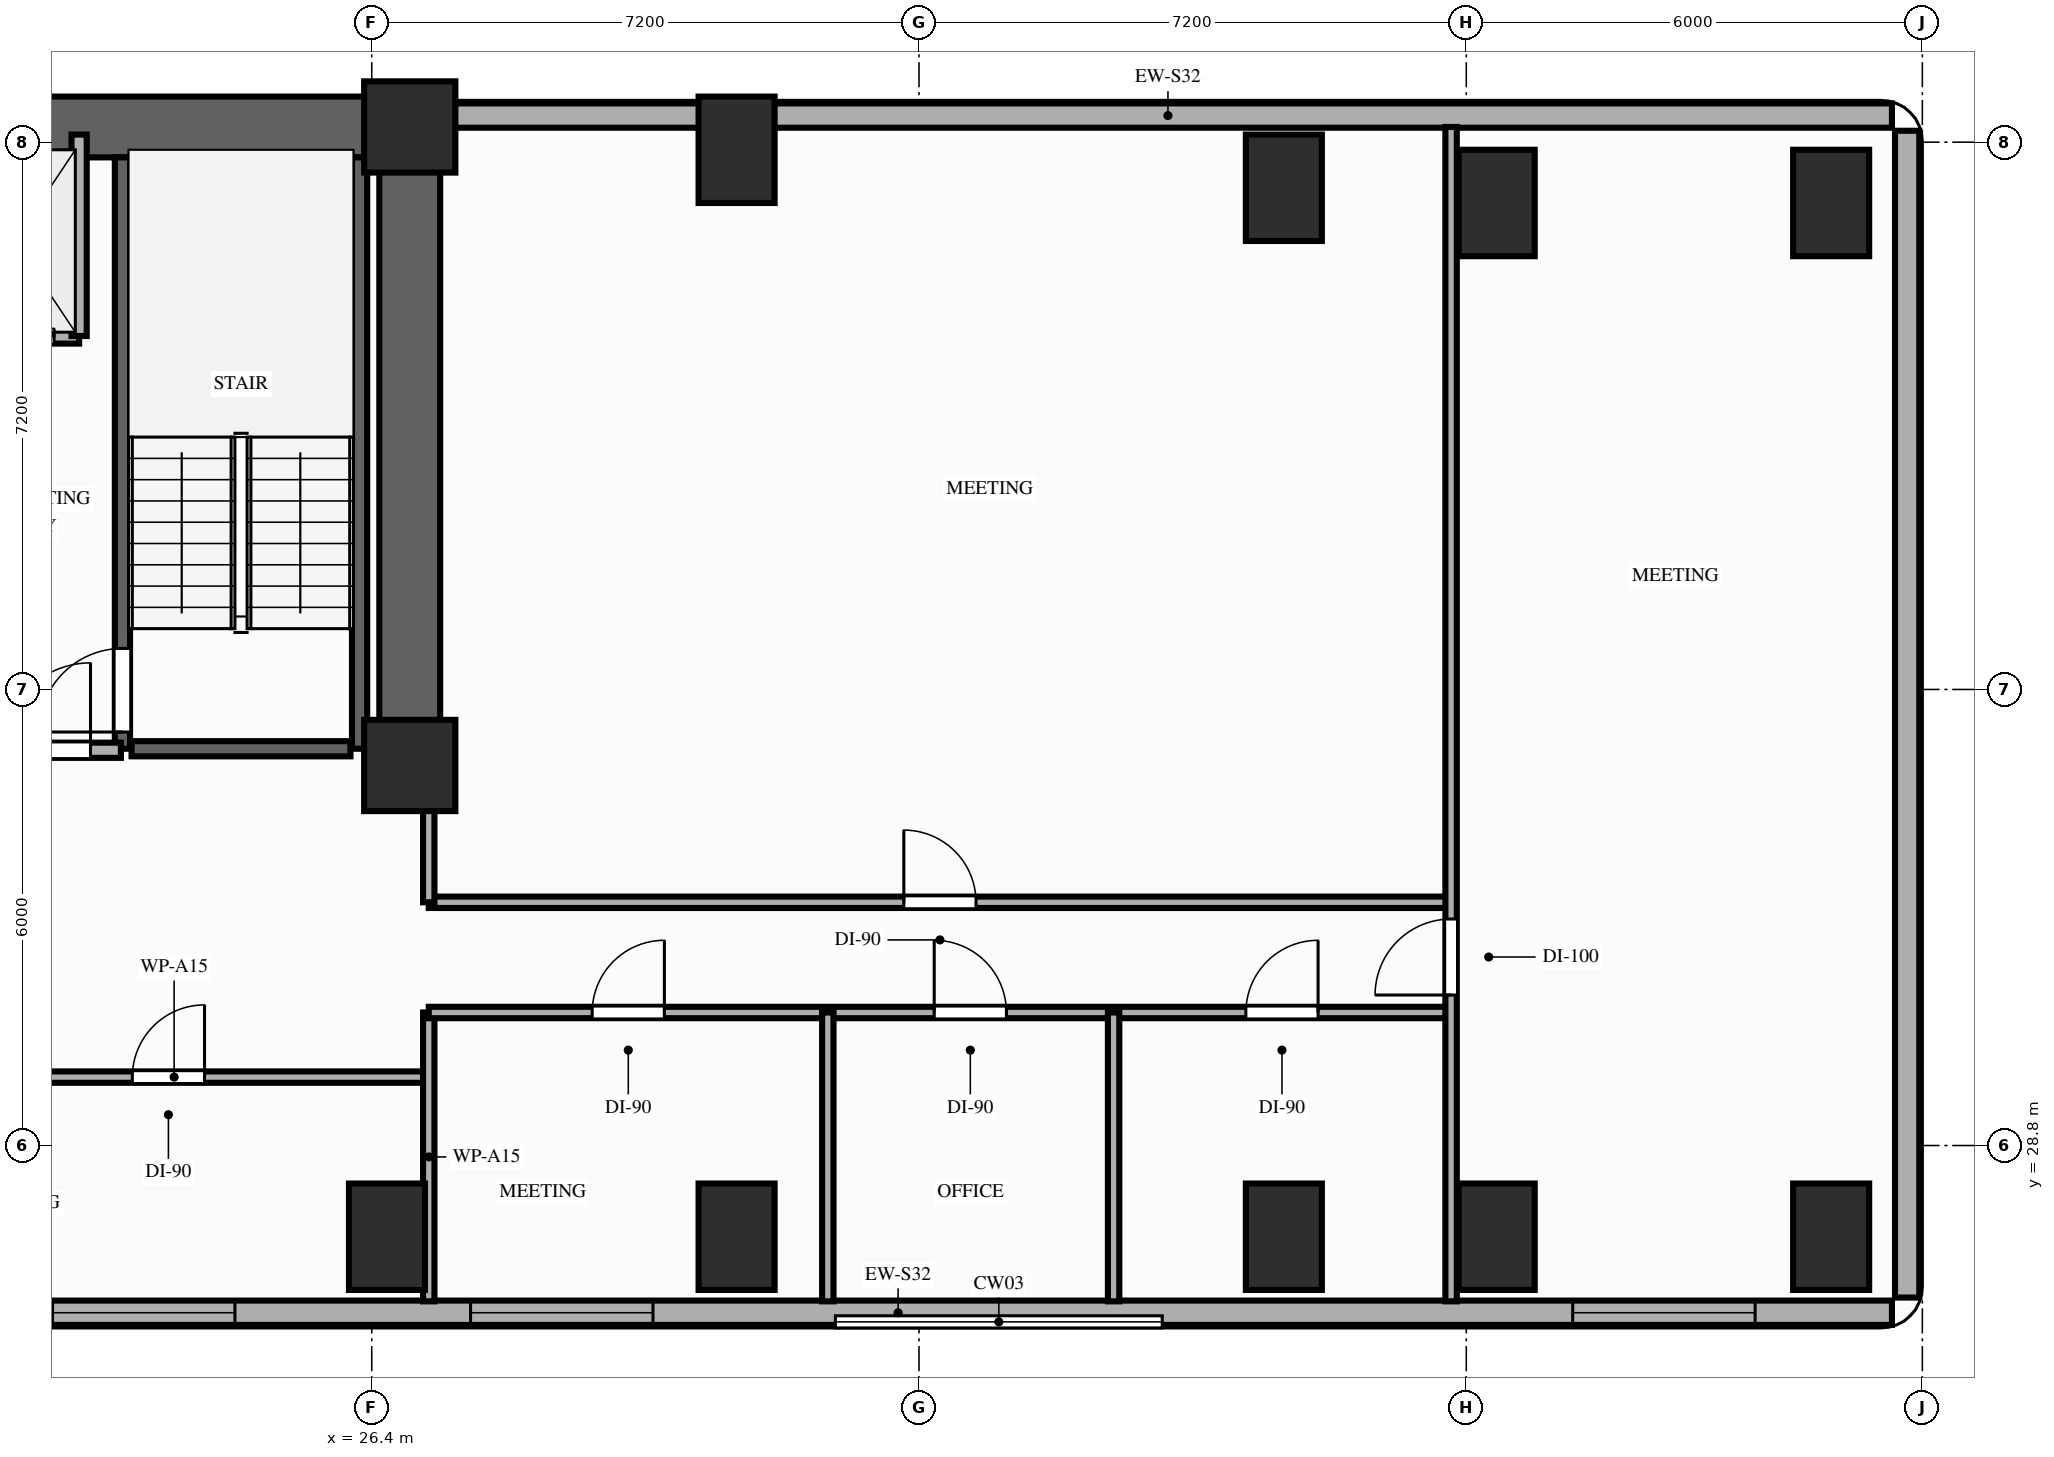
"""IFC4 building model, lengths in metres.
Left out: names, types, materials, properties, quantities, classifications, styles, units other than length and angle.
Written with IfcOpenShell. Run it as: python <this file> out.ifc"""

import sys

from ifc_helpers import new_model, si_unit, direction, frame, frame_2d, origin, origin_2d, place, context, subcontext, project, spatial, rectangle, extrude, element, fill, save


model = new_model("IFC4")
c1 = context("Model", 3, precision=1e-05, world=origin(), true_north=direction((0.0, 1.0)))
c2 = subcontext(c1, "Body", "Model", "MODEL_VIEW")
j1 = project(units=[si_unit("LENGTHUNIT", "METRE"), si_unit("PLANEANGLEUNIT", "RADIAN")], contexts=[c1])
p1 = place(None, origin())
s1 = spatial("IfcSite", under=j1, at=p1, CompositionType="ELEMENT")
p2 = place(p1, origin())
s2 = spatial("IfcBuilding", under=s1, at=p2, CompositionType="ELEMENT")
p3 = place(p2, frame((0.0, 0.0, 50.0)))
s3 = spatial("IfcBuildingStorey", under=s2, at=p3, CompositionType="ELEMENT", Elevation=50.0)
for number, where, z_axis, x_axis in (
    (1, (26.9, 33.8, 0.0), (0.0, 0.0, 1.0), (1.0, 0.0, 0.0)),
    (2, (26.9, 42.2, 0.0), (0.0, 0.0, 1.0), (1.0, 0.0, 0.0)),
):
    element("IfcColumn", number, at=place(p3, frame(where, z_axis=z_axis, x_axis=x_axis)), inside=s3, PredefinedType="COLUMN", context=c2, shape_type="SweptSolid", body=[
        extrude(rectangle(XDim=1.2, YDim=1.2, at=origin_2d()), origin(), (0.0, 0.0, 1.0), 3.2),
    ])
for number, where, z_axis, x_axis in (
    (3, (26.6, 27.6, 0.0), (0.0, 0.0, 1.0), (1.0, 0.0, 0.0)),
    (4, (31.2, 27.6, 0.0), (0.0, 0.0, 1.0), (1.0, 0.0, 0.0)),
    (5, (31.2, 41.9, 0.0), (0.0, 0.0, 1.0), (1.0, 0.0, 0.0)),
    (6, (38.4, 27.6, 0.0), (0.0, 0.0, 1.0), (1.0, 0.0, 0.0)),
    (7, (38.4, 41.4, 0.0), (0.0, 0.0, 1.0), (1.0, 0.0, 0.0)),
    (8, (41.2, 27.6, 0.0), (0.0, 0.0, 1.0), (1.0, 0.0, 0.0)),
    (9, (41.2, 41.2, 0.0), (0.0, 0.0, 1.0), (1.0, 0.0, 0.0)),
    (10, (45.6, 27.6, 0.0), (0.0, 0.0, 1.0), (1.0, 0.0, 0.0)),
    (11, (45.6, 41.2, 0.0), (0.0, 0.0, 1.0), (1.0, 0.0, 0.0)),
):
    element("IfcColumn", number, at=place(p3, frame(where, z_axis=z_axis, x_axis=x_axis)), inside=s3, PredefinedType="COLUMN", context=c2, shape_type="SweptSolid", body=[
        extrude(rectangle(XDim=1.0, YDim=1.4, at=origin_2d()), origin(), (0.0, 0.0, 1.0), 3.2),
    ])
p4 = place(p3, frame((46.4, 42.35, 0.0), z_axis=(0.0, 0.0, 1.0), x_axis=(-1.0, 0.0, 0.0)))
e12 = element("IfcWall", 12, at=p4, inside=s3, PredefinedType="STANDARD", context=c2, shape_type="SweptSolid", body=[
    extrude(rectangle(XDim=19.05, YDim=0.32, at=frame_2d((9.525, 0.0))), origin(), (0.0, 0.0, 1.0), 2.41),
])
p5 = place(p3, frame((20.25, 26.6, 0.0), z_axis=(0.0, 0.0, 1.0), x_axis=(1.0, 0.0, 0.0)))
e13 = element("IfcWall", 13, at=p5, inside=s3, PredefinedType="STANDARD", context=c2, shape_type="SweptSolid", body=[
    extrude(rectangle(XDim=26.15, YDim=0.32, at=frame_2d((13.075, 0.0))), origin(), (0.0, 0.0, 1.0), 3.02),
])
p6 = place(p5, frame((1.95, 0.0, 0.85)))
e14 = element("IfcOpeningElement", 14, at=p6, cuts=e13, PredefinedType="OPENING", context=c2, shape_type="SweptSolid", body=[
    extrude(rectangle(XDim=2.4, YDim=1.8, at=frame_2d((1.2, 0.9))), frame((0.0, 0.17, 0.0), z_axis=(0.0, -1.0, 0.0), x_axis=(1.0, 0.0, 0.0)), (0.0, 0.0, 1.0), 0.34),
])
p7 = place(p5, frame((7.45, 0.0, 0.85)))
e15 = element("IfcOpeningElement", 15, at=p7, cuts=e13, PredefinedType="OPENING", context=c2, shape_type="SweptSolid", body=[
    extrude(rectangle(XDim=2.4, YDim=1.8, at=frame_2d((1.2, 0.9))), frame((0.0, 0.17, 0.0), z_axis=(0.0, -1.0, 0.0), x_axis=(1.0, 0.0, 0.0)), (0.0, 0.0, 1.0), 0.34),
])
p8 = place(p5, frame((21.95, 0.0, 0.85)))
e16 = element("IfcOpeningElement", 16, at=p8, cuts=e13, PredefinedType="OPENING", context=c2, shape_type="SweptSolid", body=[
    extrude(rectangle(XDim=2.4, YDim=1.8, at=frame_2d((1.2, 0.9))), frame((0.0, 0.17, 0.0), z_axis=(0.0, -1.0, 0.0), x_axis=(1.0, 0.0, 0.0)), (0.0, 0.0, 1.0), 0.34),
])
p9 = place(p3, frame((46.6, 26.8, 0.0), z_axis=(0.0, 0.0, 1.0), x_axis=(0.0, 1.0, 0.0)))
e17 = element("IfcWall", 17, at=p9, inside=s3, PredefinedType="STANDARD", context=c2, shape_type="SweptSolid", body=[
    extrude(rectangle(XDim=15.35, YDim=0.32, at=frame_2d((7.675, 0.0))), origin(), (0.0, 0.0, 1.0), 3.02),
])
p10 = place(p3, frame((6.45, 42.2, 0.0), z_axis=(0.0, 0.0, 1.0), x_axis=(1.0, 0.0, 0.0)))
e18 = element("IfcWall", 18, at=p10, inside=s3, PredefinedType="SHEAR", context=c2, shape_type="SweptSolid", body=[
    extrude(rectangle(XDim=20.45, YDim=0.8, at=frame_2d((10.225, 0.0))), origin(), (0.0, 0.0, 1.0), 3.02),
])
p11 = place(p3, frame((26.9, 33.8, 0.0), z_axis=(0.0, 0.0, 1.0), x_axis=(0.0, 1.0, 0.0)))
e19 = element("IfcWall", 19, at=p11, inside=s3, PredefinedType="SHEAR", context=c2, shape_type="SweptSolid", body=[
    extrude(rectangle(XDim=7.95, YDim=0.8, at=frame_2d((3.975, 0.0))), origin(), (0.0, 0.0, 1.0), 3.02),
])
p12 = place(p3, frame((23.12, 34.02, 0.0), z_axis=(0.0, 0.0, 1.0), x_axis=(0.0, 1.0, 0.0)))
e20 = element("IfcWall", 20, at=p12, inside=s3, PredefinedType="SHEAR", context=c2, shape_type="SweptSolid", body=[
    extrude(rectangle(XDim=7.78, YDim=0.2, at=frame_2d((3.89, 0.0))), origin(), (0.0, 0.0, 1.0), 3.02),
])
p13 = place(p12, frame((0.22, 0.0, 0.0)))
e21 = element("IfcOpeningElement", 21, at=p13, cuts=e20, PredefinedType="OPENING", context=c2, shape_type="SweptSolid", body=[
    extrude(rectangle(XDim=1.1, YDim=2.15, at=frame_2d((0.55, 1.075))), frame((0.0, 0.11, 0.0), z_axis=(0.0, -1.0, 0.0), x_axis=(1.0, 0.0, 0.0)), (0.0, 0.0, 1.0), 0.22),
])
p14 = place(p3, frame((26.24, 34.02, 0.0), z_axis=(0.0, 0.0, 1.0), x_axis=(0.0, 1.0, 0.0)))
e22 = element("IfcWall", 22, at=p14, inside=s3, PredefinedType="SHEAR", context=c2, shape_type="SweptSolid", body=[
    extrude(rectangle(XDim=7.78, YDim=0.2, at=frame_2d((3.89, 0.0))), origin(), (0.0, 0.0, 1.0), 3.02),
])
p15 = place(p3, frame((23.24, 34.02, 0.0), z_axis=(0.0, 0.0, 1.0), x_axis=(1.0, 0.0, 0.0)))
e23 = element("IfcWall", 23, at=p15, inside=s3, PredefinedType="SHEAR", context=c2, shape_type="SweptSolid", body=[
    extrude(rectangle(XDim=2.88, YDim=0.2, at=frame_2d((1.44, 0.0))), origin(), (0.0, 0.0, 1.0), 3.02),
])
p16 = place(p3, frame((20.85, 39.45, 0.0), z_axis=(0.0, 0.0, 1.0), x_axis=(1.0, 0.0, 0.0)))
e24 = element("IfcWall", 24, at=p16, inside=s3, PredefinedType="MOVABLE", context=c2, shape_type="SweptSolid", body=[
    extrude(rectangle(XDim=1.7, YDim=0.2, at=frame_2d((0.85, 0.0))), origin(), (0.0, 0.0, 1.0), 3.02),
])
p17 = place(p16, frame((0.32, 0.0, 0.0)))
e25 = element("IfcOpeningElement", 25, at=p17, cuts=e24, PredefinedType="OPENING", context=c2, shape_type="SweptSolid", body=[
    extrude(rectangle(XDim=1.05, YDim=2.15, at=frame_2d((0.525, 1.075))), frame((0.0, 0.11, 0.0), z_axis=(0.0, -1.0, 0.0), x_axis=(1.0, 0.0, 0.0)), (0.0, 0.0, 1.0), 0.22),
])
p18 = place(p3, frame((22.55, 39.45, 0.0), z_axis=(0.0, 0.0, 1.0), x_axis=(0.0, 1.0, 0.0)))
e26 = element("IfcWall", 26, at=p18, inside=s3, PredefinedType="MOVABLE", context=c2, shape_type="SweptSolid", body=[
    extrude(rectangle(XDim=2.65, YDim=0.2, at=frame_2d((1.325, 0.0))), origin(), (0.0, 0.0, 1.0), 2.41),
])
p19 = place(p3, frame((20.5, 34.0, 0.0), z_axis=(0.0, 0.0, 1.0), x_axis=(1.0, 0.0, 0.0)))
e27 = element("IfcWall", 27, at=p19, inside=s3, PredefinedType="PARTITIONING", context=c2, shape_type="SweptSolid", body=[
    extrude(rectangle(XDim=2.6, YDim=0.2, at=frame_2d((1.3, 0.0))), origin(), (0.0, 0.0, 1.0), 2.41),
])
p20 = place(p19, frame((1.05, 0.0, 0.0)))
e28 = element("IfcOpeningElement", 28, at=p20, cuts=e27, PredefinedType="OPENING", context=c2, shape_type="SweptSolid", body=[
    extrude(rectangle(XDim=1.15, YDim=2.15, at=frame_2d((0.575, 1.075))), frame((0.0, 0.11, 0.0), z_axis=(0.0, -1.0, 0.0), x_axis=(1.0, 0.0, 0.0)), (0.0, 0.0, 1.0), 0.22),
])
p21 = place(p3, frame((20.45, 29.7, 0.0), z_axis=(0.0, 0.0, 1.0), x_axis=(1.0, 0.0, 0.0)))
e29 = element("IfcWall", 29, at=p21, inside=s3, PredefinedType="PARTITIONING", context=c2, shape_type="SweptSolid", body=[
    extrude(rectangle(XDim=6.7, YDim=0.15, at=frame_2d((3.35, 0.0))), origin(), (0.0, 0.0, 1.0), 3.02),
])
p22 = place(p21, frame((2.8, 0.0, 0.0)))
e30 = element("IfcOpeningElement", 30, at=p22, cuts=e29, PredefinedType="OPENING", context=c2, shape_type="SweptSolid", body=[
    extrude(rectangle(XDim=0.95, YDim=2.15, at=frame_2d((0.475, 1.075))), frame((0.0, 0.085, 0.0), z_axis=(0.0, -1.0, 0.0), x_axis=(1.0, 0.0, 0.0)), (0.0, 0.0, 1.0), 0.17),
])
p23 = place(p3, frame((27.15, 26.75, 0.0), z_axis=(0.0, 0.0, 1.0), x_axis=(0.0, 1.0, 0.0)))
e31 = element("IfcWall", 31, at=p23, inside=s3, PredefinedType="PARTITIONING", context=c2, shape_type="SweptSolid", body=[
    extrude(rectangle(XDim=3.8, YDim=0.15, at=frame_2d((1.9, 0.0))), origin(), (0.0, 0.0, 1.0), 2.41),
])
p24 = place(p3, frame((27.15, 30.55, 0.0), z_axis=(0.0, 0.0, 1.0), x_axis=(1.0, 0.0, 0.0)))
e32 = element("IfcWall", 32, at=p24, inside=s3, PredefinedType="PARTITIONING", context=c2, shape_type="SweptSolid", body=[
    extrude(rectangle(XDim=13.45, YDim=0.15, at=frame_2d((6.725, 0.0))), origin(), (0.0, 0.0, 1.0), 2.41),
])
p25 = place(p24, frame((2.15, 0.0, 0.0)))
e33 = element("IfcOpeningElement", 33, at=p25, cuts=e32, PredefinedType="OPENING", context=c2, shape_type="SweptSolid", body=[
    extrude(rectangle(XDim=0.95, YDim=2.15, at=frame_2d((0.475, 1.075))), frame((0.0, 0.085, 0.0), z_axis=(0.0, -1.0, 0.0), x_axis=(1.0, 0.0, 0.0)), (0.0, 0.0, 1.0), 0.17),
])
p26 = place(p24, frame((6.65, 0.0, 0.0)))
e34 = element("IfcOpeningElement", 34, at=p26, cuts=e32, PredefinedType="OPENING", context=c2, shape_type="SweptSolid", body=[
    extrude(rectangle(XDim=0.95, YDim=2.15, at=frame_2d((0.475, 1.075))), frame((0.0, 0.085, 0.0), z_axis=(0.0, -1.0, 0.0), x_axis=(1.0, 0.0, 0.0)), (0.0, 0.0, 1.0), 0.17),
])
p27 = place(p24, frame((10.75, 0.0, 0.0)))
e35 = element("IfcOpeningElement", 35, at=p27, cuts=e32, PredefinedType="OPENING", context=c2, shape_type="SweptSolid", body=[
    extrude(rectangle(XDim=0.95, YDim=2.15, at=frame_2d((0.475, 1.075))), frame((0.0, 0.085, 0.0), z_axis=(0.0, -1.0, 0.0), x_axis=(1.0, 0.0, 0.0)), (0.0, 0.0, 1.0), 0.17),
])
p28 = place(p3, frame((27.15, 32.0, 0.0), z_axis=(0.0, 0.0, 1.0), x_axis=(1.0, 0.0, 0.0)))
e36 = element("IfcWall", 36, at=p28, inside=s3, PredefinedType="PARTITIONING", context=c2, shape_type="SweptSolid", body=[
    extrude(rectangle(XDim=13.45, YDim=0.15, at=frame_2d((6.725, 0.0))), origin(), (0.0, 0.0, 1.0), 2.41),
])
p29 = place(p28, frame((6.25, 0.0, 0.0)))
e37 = element("IfcOpeningElement", 37, at=p29, cuts=e36, PredefinedType="OPENING", context=c2, shape_type="SweptSolid", body=[
    extrude(rectangle(XDim=0.95, YDim=2.15, at=frame_2d((0.475, 1.075))), frame((0.0, 0.085, 0.0), z_axis=(0.0, -1.0, 0.0), x_axis=(1.0, 0.0, 0.0)), (0.0, 0.0, 1.0), 0.17),
])
p30 = place(p3, frame((27.15, 32.0, 0.0), z_axis=(0.0, 0.0, 1.0), x_axis=(0.0, 1.0, 0.0)))
e38 = element("IfcWall", 38, at=p30, inside=s3, PredefinedType="PARTITIONING", context=c2, shape_type="SweptSolid", body=[
    extrude(rectangle(XDim=1.68, YDim=0.15, at=frame_2d((0.84, 0.0))), origin(), (0.0, 0.0, 1.0), 2.41),
])
p31 = place(p3, frame((40.6, 26.75, 0.0), z_axis=(0.0, 0.0, 1.0), x_axis=(0.0, 1.0, 0.0)))
e39 = element("IfcWall", 39, at=p31, inside=s3, PredefinedType="PARTITIONING", context=c2, shape_type="SweptSolid", body=[
    extrude(rectangle(XDim=15.45, YDim=0.15, at=frame_2d((7.725, 0.0))), origin(), (0.0, 0.0, 1.0), 2.41),
])
p32 = place(p31, frame((4.03, 0.0, 0.0)))
e40 = element("IfcOpeningElement", 40, at=p32, cuts=e39, PredefinedType="OPENING", context=c2, shape_type="SweptSolid", body=[
    extrude(rectangle(XDim=1.0, YDim=2.15, at=frame_2d((0.5, 1.075))), frame((0.0, 0.085, 0.0), z_axis=(0.0, -1.0, 0.0), x_axis=(1.0, 0.0, 0.0)), (0.0, 0.0, 1.0), 0.17),
])
for number, where, z_axis, x_axis in (
    (41, (32.4, 26.75, 0.0), (0.0, 0.0, 1.0), (0.0, 1.0, 0.0)),
    (42, (36.16, 26.75, 0.0), (0.0, 0.0, 1.0), (0.0, 1.0, 0.0)),
):
    element("IfcWall", number, at=place(p3, frame(where, z_axis=z_axis, x_axis=x_axis)), inside=s3, PredefinedType="PARTITIONING", context=c2, shape_type="SweptSolid", body=[
        extrude(rectangle(XDim=3.8, YDim=0.15, at=frame_2d((1.9, 0.0))), origin(), (0.0, 0.0, 1.0), 2.41),
    ])
p33 = place(p6, origin())
e43 = element("IfcWindow", 43, at=p33, inside=s3, PartitioningType="SINGLE_PANEL", PredefinedType="WINDOW", context=c2, shape_type="SweptSolid", body=[
    extrude(rectangle(XDim=2.4, YDim=1.8, at=frame_2d((1.2, 0.9))), frame((0.0, 0.03, 0.0), z_axis=(0.0, -1.0, 0.0), x_axis=(1.0, 0.0, 0.0)), (0.0, 0.0, 1.0), 0.06),
])
fill(e14, e43)
p34 = place(p7, origin())
e44 = element("IfcWindow", 44, at=p34, inside=s3, PartitioningType="SINGLE_PANEL", PredefinedType="WINDOW", context=c2, shape_type="SweptSolid", body=[
    extrude(rectangle(XDim=2.4, YDim=1.8, at=frame_2d((1.2, 0.9))), frame((0.0, 0.03, 0.0), z_axis=(0.0, -1.0, 0.0), x_axis=(1.0, 0.0, 0.0)), (0.0, 0.0, 1.0), 0.06),
])
fill(e15, e44)
p35 = place(p8, origin())
e45 = element("IfcWindow", 45, at=p35, inside=s3, PartitioningType="SINGLE_PANEL", PredefinedType="WINDOW", context=c2, shape_type="SweptSolid", body=[
    extrude(rectangle(XDim=2.4, YDim=1.8, at=frame_2d((1.2, 0.9))), frame((0.0, 0.03, 0.0), z_axis=(0.0, -1.0, 0.0), x_axis=(1.0, 0.0, 0.0)), (0.0, 0.0, 1.0), 0.06),
])
fill(e16, e45)
p36 = place(p13, origin())
e46 = element("IfcDoor", 46, at=p36, inside=s3, OperationType="SINGLE_SWING_LEFT", PredefinedType="DOOR", context=c2, shape_type="SweptSolid", body=[
    extrude(rectangle(XDim=1.1, YDim=2.15, at=frame_2d((0.55, 1.075))), frame((0.0, 0.025, 0.0), z_axis=(0.0, -1.0, 0.0), x_axis=(1.0, 0.0, 0.0)), (0.0, 0.0, 1.0), 0.05),
])
fill(e21, e46)
p37 = place(p17, origin())
e47 = element("IfcDoor", 47, at=p37, inside=s3, OperationType="SLIDING_TO_LEFT", PredefinedType="DOOR", context=c2, shape_type="SweptSolid", body=[
    extrude(rectangle(XDim=1.05, YDim=2.15, at=frame_2d((0.525, 1.075))), frame((0.0, 0.025, 0.0), z_axis=(0.0, -1.0, 0.0), x_axis=(1.0, 0.0, 0.0)), (0.0, 0.0, 1.0), 0.05),
])
fill(e25, e47)
p38 = place(p20, origin())
e48 = element("IfcDoor", 48, at=p38, inside=s3, OperationType="SINGLE_SWING_RIGHT", PredefinedType="DOOR", context=c2, shape_type="SweptSolid", body=[
    extrude(rectangle(XDim=1.15, YDim=2.15, at=frame_2d((0.575, 1.075))), frame((0.0, 0.025, 0.0), z_axis=(0.0, -1.0, 0.0), x_axis=(1.0, 0.0, 0.0)), (0.0, 0.0, 1.0), 0.05),
])
fill(e28, e48)
p39 = place(p22, origin())
e49 = element("IfcDoor", 49, at=p39, inside=s3, OperationType="SINGLE_SWING_RIGHT", PredefinedType="DOOR", context=c2, shape_type="SweptSolid", body=[
    extrude(rectangle(XDim=0.95, YDim=2.15, at=frame_2d((0.475, 1.075))), frame((0.0, 0.025, 0.0), z_axis=(0.0, -1.0, 0.0), x_axis=(1.0, 0.0, 0.0)), (0.0, 0.0, 1.0), 0.05),
])
fill(e30, e49)
p40 = place(p32, origin())
e50 = element("IfcDoor", 50, at=p40, inside=s3, OperationType="SINGLE_SWING_LEFT", PredefinedType="DOOR", context=c2, shape_type="SweptSolid", body=[
    extrude(rectangle(XDim=1.0, YDim=2.15, at=frame_2d((0.5, 1.075))), frame((0.0, 0.025, 0.0), z_axis=(0.0, -1.0, 0.0), x_axis=(1.0, 0.0, 0.0)), (0.0, 0.0, 1.0), 0.05),
])
fill(e40, e50)
p41 = place(p25, origin())
e51 = element("IfcDoor", 51, at=p41, inside=s3, OperationType="SINGLE_SWING_RIGHT", PredefinedType="DOOR", context=c2, shape_type="SweptSolid", body=[
    extrude(rectangle(XDim=0.95, YDim=2.15, at=frame_2d((0.475, 1.075))), frame((0.0, 0.025, 0.0), z_axis=(0.0, -1.0, 0.0), x_axis=(1.0, 0.0, 0.0)), (0.0, 0.0, 1.0), 0.05),
])
fill(e33, e51)
p42 = place(p26, origin())
e52 = element("IfcDoor", 52, at=p42, inside=s3, OperationType="SINGLE_SWING_LEFT", PredefinedType="DOOR", context=c2, shape_type="SweptSolid", body=[
    extrude(rectangle(XDim=0.95, YDim=2.15, at=frame_2d((0.475, 1.075))), frame((0.0, 0.025, 0.0), z_axis=(0.0, -1.0, 0.0), x_axis=(1.0, 0.0, 0.0)), (0.0, 0.0, 1.0), 0.05),
])
fill(e34, e52)
p43 = place(p27, origin())
e53 = element("IfcDoor", 53, at=p43, inside=s3, OperationType="SINGLE_SWING_RIGHT", PredefinedType="DOOR", context=c2, shape_type="SweptSolid", body=[
    extrude(rectangle(XDim=0.95, YDim=2.15, at=frame_2d((0.475, 1.075))), frame((0.0, 0.025, 0.0), z_axis=(0.0, -1.0, 0.0), x_axis=(1.0, 0.0, 0.0)), (0.0, 0.0, 1.0), 0.05),
])
fill(e35, e53)
p44 = place(p29, origin())
e54 = element("IfcDoor", 54, at=p44, inside=s3, OperationType="SINGLE_SWING_LEFT", PredefinedType="DOOR", context=c2, shape_type="SweptSolid", body=[
    extrude(rectangle(XDim=0.95, YDim=2.15, at=frame_2d((0.475, 1.075))), frame((0.0, 0.025, 0.0), z_axis=(0.0, -1.0, 0.0), x_axis=(1.0, 0.0, 0.0)), (0.0, 0.0, 1.0), 0.05),
])
fill(e37, e54)
save(model, sys.argv[1])
